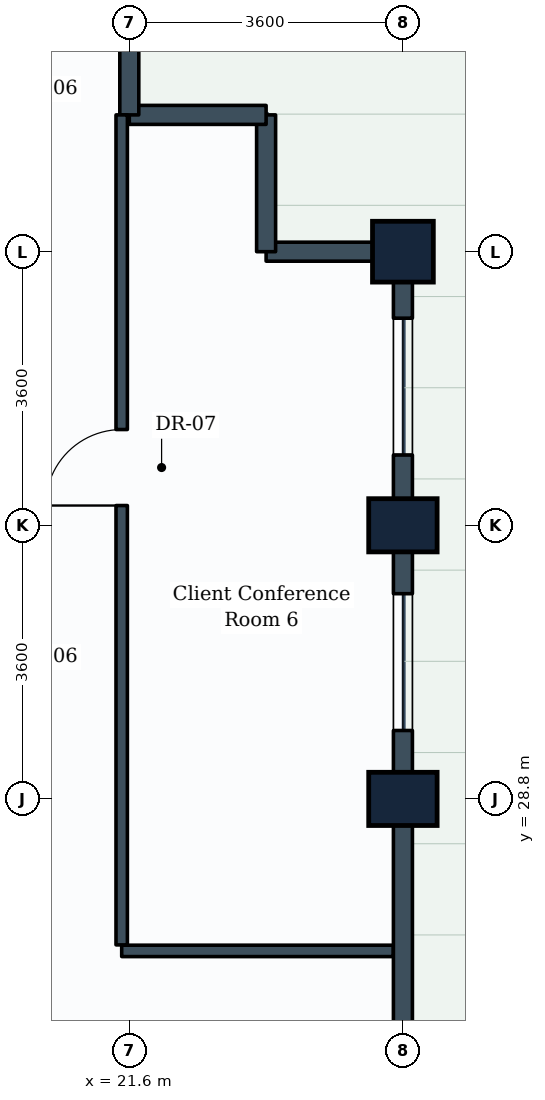
"""IFC4 building model, lengths in metres.
Left out: names, types, materials, properties, quantities, classifications, styles, units other than length and angle.
Written with IfcOpenShell. Run it as: python <this file> out.ifc"""

import sys

from ifc_helpers import new_model, si_unit, direction, frame, frame_2d, origin, origin_2d, place, context, subcontext, project, spatial, rectangle, extrude, element, fill, save


model = new_model("IFC4")
c1 = context("Model", 3, precision=1e-05, world=origin(), true_north=direction((0.0, 1.0)))
c2 = subcontext(c1, "Body", "Model", "MODEL_VIEW")
j1 = project(units=[si_unit("LENGTHUNIT", "METRE"), si_unit("PLANEANGLEUNIT", "RADIAN")], contexts=[c1])
p1 = place(None, origin())
s1 = spatial("IfcSite", under=j1, at=p1, CompositionType="ELEMENT")
p2 = place(p1, origin())
s2 = spatial("IfcBuilding", under=s1, at=p2, CompositionType="ELEMENT")
p3 = place(p2, frame((0.0, 0.0, 174.8)))
s3 = spatial("IfcBuildingStorey", under=s2, at=p3, CompositionType="ELEMENT", Elevation=174.8)
for number, where, z_axis, x_axis in (
    (1, (25.2, 28.8, 0.0), (0.0, 0.0, 1.0), (0.0, 1.0, 0.0)),
    (2, (25.2, 32.4, 0.0), (0.0, 0.0, 1.0), (0.0, 1.0, 0.0)),
):
    element("IfcColumn", number, at=place(p3, frame(where, z_axis=z_axis, x_axis=x_axis)), inside=s3, PredefinedType="COLUMN", context=c2, shape_type="SweptSolid", body=[
        extrude(rectangle(XDim=0.7, YDim=0.9, at=origin_2d()), origin(), (0.0, 0.0, 1.0), 3.8),
    ])
p4 = place(p3, frame((25.2, 36.0, 0.0), z_axis=(0.0, 0.0, 1.0), x_axis=(0.0, 1.0, 0.0)))
e3 = element("IfcColumn", 3, at=p4, inside=s3, PredefinedType="COLUMN", context=c2, shape_type="SweptSolid", body=[
    extrude(rectangle(XDim=0.8, YDim=0.8, at=origin_2d()), origin(), (0.0, 0.0, 1.0), 3.8),
])
p5 = place(p3, frame((25.2, 25.2, 0.0), z_axis=(0.0, 0.0, 1.0), x_axis=(0.0, 1.0, 0.0)))
e4 = element("IfcWall", 4, at=p5, inside=s3, PredefinedType="STANDARD", context=c2, shape_type="SweptSolid", body=[
    extrude(rectangle(XDim=3.6, YDim=0.25, at=frame_2d((1.8, 0.0))), origin(), (0.0, 0.0, 1.0), 2.93),
])
p6 = place(p3, frame((25.2, 28.8, 0.0), z_axis=(0.0, 0.0, 1.0), x_axis=(0.0, 1.0, 0.0)))
e5 = element("IfcWall", 5, at=p6, inside=s3, PredefinedType="STANDARD", context=c2, shape_type="SweptSolid", body=[
    extrude(rectangle(XDim=3.6, YDim=0.25, at=frame_2d((1.8, 0.0))), origin(), (0.0, 0.0, 1.0), 2.93),
])
p7 = place(p6, frame((0.9, 0.0, 0.85)))
e6 = element("IfcOpeningElement", 6, at=p7, cuts=e5, PredefinedType="OPENING", context=c2, shape_type="SweptSolid", body=[
    extrude(rectangle(XDim=1.8, YDim=1.35, at=frame_2d((0.9, 0.675))), frame((0.0, 0.135, 0.0), z_axis=(0.0, -1.0, 0.0), x_axis=(1.0, 0.0, 0.0)), (0.0, 0.0, 1.0), 0.27),
])
p8 = place(p3, frame((25.2, 32.4, 0.0), z_axis=(0.0, 0.0, 1.0), x_axis=(0.0, 1.0, 0.0)))
e7 = element("IfcWall", 7, at=p8, inside=s3, PredefinedType="STANDARD", context=c2, shape_type="SweptSolid", body=[
    extrude(rectangle(XDim=3.6, YDim=0.25, at=frame_2d((1.8, 0.0))), origin(), (0.0, 0.0, 1.0), 2.93),
])
p9 = place(p8, frame((0.925, 0.0, 0.85)))
e8 = element("IfcOpeningElement", 8, at=p9, cuts=e7, PredefinedType="OPENING", context=c2, shape_type="SweptSolid", body=[
    extrude(rectangle(XDim=1.8, YDim=1.35, at=frame_2d((0.9, 0.675))), frame((0.0, 0.135, 0.0), z_axis=(0.0, -1.0, 0.0), x_axis=(1.0, 0.0, 0.0)), (0.0, 0.0, 1.0), 0.27),
])
p10 = place(p3, frame((23.4, 36.0, 0.0), z_axis=(0.0, 0.0, 1.0), x_axis=(1.0, 0.0, 0.0)))
e9 = element("IfcWall", 9, at=p10, inside=s3, PredefinedType="STANDARD", context=c2, shape_type="SweptSolid", body=[
    extrude(rectangle(XDim=1.8, YDim=0.25, at=frame_2d((0.9, 0.0))), origin(), (0.0, 0.0, 1.0), 2.93),
])
p11 = place(p3, frame((23.4, 36.0, 0.0), z_axis=(0.0, 0.0, 1.0), x_axis=(0.0, 1.0, 0.0)))
e10 = element("IfcWall", 10, at=p11, inside=s3, PredefinedType="STANDARD", context=c2, shape_type="SweptSolid", body=[
    extrude(rectangle(XDim=1.8, YDim=0.25, at=frame_2d((0.9, 0.0))), origin(), (0.0, 0.0, 1.0), 3.535),
])
p12 = place(p3, frame((21.6, 37.8, 0.0), z_axis=(0.0, 0.0, 1.0), x_axis=(1.0, 0.0, 0.0)))
e11 = element("IfcWall", 11, at=p12, inside=s3, PredefinedType="STANDARD", context=c2, shape_type="SweptSolid", body=[
    extrude(rectangle(XDim=1.8, YDim=0.25, at=frame_2d((0.9, 0.0))), origin(), (0.0, 0.0, 1.0), 3.535),
])
p13 = place(p3, frame((21.6, 37.8, 0.0), z_axis=(0.0, 0.0, 1.0), x_axis=(0.0, 1.0, 0.0)))
e12 = element("IfcWall", 12, at=p13, inside=s3, PredefinedType="STANDARD", context=c2, shape_type="SweptSolid", body=[
    extrude(rectangle(XDim=1.8, YDim=0.25, at=frame_2d((0.9, 0.0))), origin(), (0.0, 0.0, 1.0), 2.93),
])
p14 = place(p3, frame((21.5, 26.8, 0.0), z_axis=(0.0, 0.0, 1.0), x_axis=(1.0, 0.0, 0.0)))
e13 = element("IfcWall", 13, at=p14, inside=s3, PredefinedType="PARTITIONING", context=c2, shape_type="SweptSolid", body=[
    extrude(rectangle(XDim=3.571, YDim=0.15, at=frame_2d((1.786, 0.0))), origin(), (0.0, 0.0, 1.0), 2.93),
])
p15 = place(p3, frame((21.5, 26.879, 0.0), z_axis=(0.0, 0.0, 1.0), x_axis=(0.0, 1.0, 0.0)))
e14 = element("IfcWall", 14, at=p15, inside=s3, PredefinedType="PARTITIONING", context=c2, shape_type="SweptSolid", body=[
    extrude(rectangle(XDim=10.921, YDim=0.15, at=frame_2d((5.46, 0.0))), origin(), (0.0, 0.0, 1.0), 3.17),
])
p16 = place(p15, frame((5.781, 0.0, 0.0)))
e15 = element("IfcOpeningElement", 15, at=p16, cuts=e14, PredefinedType="OPENING", context=c2, shape_type="SweptSolid", body=[
    extrude(rectangle(XDim=1.0, YDim=2.1, at=frame_2d((0.5, 1.05))), frame((0.0, 0.085, 0.0), z_axis=(0.0, -1.0, 0.0), x_axis=(1.0, 0.0, 0.0)), (0.0, 0.0, 1.0), 0.17),
])
p17 = place(p7, origin())
e16 = element("IfcWindow", 16, at=p17, inside=s3, PartitioningType="SINGLE_PANEL", PredefinedType="WINDOW", context=c2, shape_type="SweptSolid", body=[
    extrude(rectangle(XDim=1.8, YDim=1.35, at=frame_2d((0.9, 0.675))), frame((0.0, 0.03, 0.0), z_axis=(0.0, -1.0, 0.0), x_axis=(1.0, 0.0, 0.0)), (0.0, 0.0, 1.0), 0.06),
])
fill(e6, e16)
p18 = place(p9, origin())
e17 = element("IfcWindow", 17, at=p18, inside=s3, PartitioningType="SINGLE_PANEL", PredefinedType="WINDOW", context=c2, shape_type="SweptSolid", body=[
    extrude(rectangle(XDim=1.8, YDim=1.35, at=frame_2d((0.9, 0.675))), frame((0.0, 0.03, 0.0), z_axis=(0.0, -1.0, 0.0), x_axis=(1.0, 0.0, 0.0)), (0.0, 0.0, 1.0), 0.06),
])
fill(e8, e17)
p19 = place(p16, origin())
e18 = element("IfcDoor", 18, at=p19, inside=s3, OperationType="SINGLE_SWING_LEFT", PredefinedType="DOOR", context=c2, shape_type="SweptSolid", body=[
    extrude(rectangle(XDim=1.0, YDim=2.1, at=frame_2d((0.5, 1.05))), frame((0.0, 0.025, 0.0), z_axis=(0.0, -1.0, 0.0), x_axis=(1.0, 0.0, 0.0)), (0.0, 0.0, 1.0), 0.05),
])
fill(e15, e18)
save(model, sys.argv[1])
